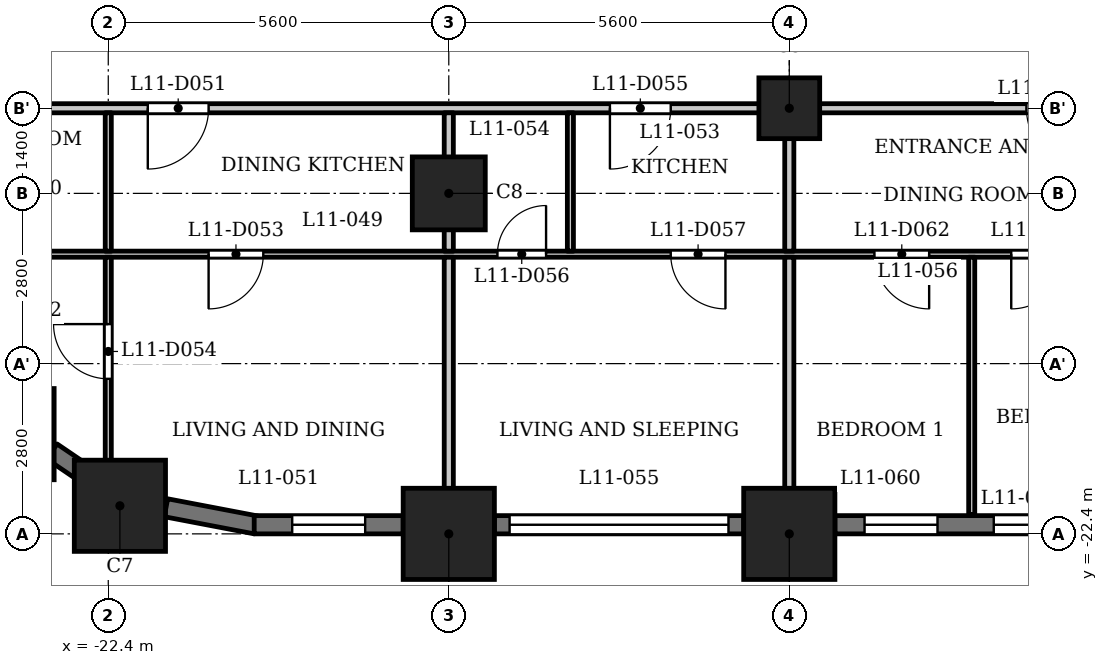
"""IFC4 building model, lengths in metres.
Left out: names, types, materials, properties, quantities, classifications, styles, units other than length and angle.
Written with IfcOpenShell. Run it as: python <this file> out.ifc"""

import sys

from ifc_helpers import new_model, si_unit, direction, frame, frame_2d, origin, origin_2d, place, context, subcontext, project, spatial, rectangle, extrude, element, fill, save


model = new_model("IFC4")
c1 = context("Model", 3, precision=1e-05, world=origin(), true_north=direction((0.0, 1.0)))
c2 = subcontext(c1, "Body", "Model", "MODEL_VIEW")
j1 = project(units=[si_unit("LENGTHUNIT", "METRE"), si_unit("PLANEANGLEUNIT", "RADIAN")], contexts=[c1])
p1 = place(None, origin())
s1 = spatial("IfcSite", under=j1, at=p1, CompositionType="ELEMENT")
p2 = place(p1, origin())
s2 = spatial("IfcBuilding", under=s1, at=p2, CompositionType="ELEMENT")
p3 = place(p2, frame((0.0, 0.0, 48.0)))
s3 = spatial("IfcBuildingStorey", under=s2, at=p3, CompositionType="ELEMENT", Elevation=48.0)
for number, where, z_axis, x_axis in (
    (1, (-22.209, -21.938, 0.0), (0.0, 0.0, 1.0), (1.0, 0.0, 0.0)),
    (2, (-16.8, -22.4, 0.0), (0.0, 0.0, 1.0), (1.0, 0.0, 0.0)),
    (3, (-11.2, -22.4, 0.0), (0.0, 0.0, 1.0), (1.0, 0.0, 0.0)),
    (4, (-24.04, -20.76, 0.0), (0.0, 0.0, 1.0), (1.0, 0.0, 0.0)),
):
    element("IfcColumn", number, at=place(p3, frame(where, z_axis=z_axis, x_axis=x_axis)), inside=s3, PredefinedType="COLUMN", context=c2, shape_type="SweptSolid", body=[
        extrude(rectangle(XDim=1.5, YDim=1.5, at=origin_2d()), origin(), (0.0, 0.0, 1.0), 3.5),
    ])
p4 = place(p3, frame((-16.8, -16.8, 0.0), z_axis=(0.0, 0.0, 1.0), x_axis=(1.0, 0.0, 0.0)))
e5 = element("IfcColumn", 5, at=p4, inside=s3, PredefinedType="COLUMN", context=c2, shape_type="SweptSolid", body=[
    extrude(rectangle(XDim=1.2, YDim=1.2, at=origin_2d()), origin(), (0.0, 0.0, 1.0), 3.5),
])
p5 = place(p3, frame((-11.2, -15.4, 0.0), z_axis=(0.0, 0.0, 1.0), x_axis=(1.0, 0.0, 0.0)))
e6 = element("IfcColumn", 6, at=p5, inside=s3, PredefinedType="COLUMN", context=c2, shape_type="SweptSolid", body=[
    extrude(rectangle(XDim=1.0, YDim=1.0, at=origin_2d()), origin(), (0.0, 0.0, 1.0), 3.5),
])
p6 = place(p3, frame((-23.327, -21.045, 0.0), z_axis=(0.0, 0.0, 1.0), x_axis=(0.827080706709, -0.562083182981, 0.0)))
e7 = element("IfcWall", 7, at=p6, inside=s3, PredefinedType="SOLIDWALL", context=c2, shape_type="SweptSolid", body=[
    extrude(rectangle(XDim=0.677, YDim=0.3, at=frame_2d((0.339, 0.0))), origin(), (0.0, 0.0, 1.0), 3.2),
])
p7 = place(p3, frame((-21.451, -21.97, 0.0), z_axis=(0.0, 0.0, 1.0), x_axis=(0.982287454367, -0.187380247071, 0.0)))
e8 = element("IfcWall", 8, at=p7, inside=s3, PredefinedType="SOLIDWALL", context=c2, shape_type="SweptSolid", body=[
    extrude(rectangle(XDim=1.506, YDim=0.3, at=frame_2d((0.753, 0.0))), origin(), (0.0, 0.0, 1.0), 2.35),
])
p8 = place(p3, frame((-20.0, -22.25, 0.0), z_axis=(0.0, 0.0, 1.0), x_axis=(1.0, 0.0, 0.0)))
e9 = element("IfcWall", 9, at=p8, inside=s3, PredefinedType="SOLIDWALL", context=c2, shape_type="SweptSolid", body=[
    extrude(rectangle(XDim=2.45, YDim=0.3, at=frame_2d((1.225, 0.0))), origin(), (0.0, 0.0, 1.0), 2.35),
])
p9 = place(p8, frame((0.625, 0.0, 0.6)))
e10 = element("IfcOpeningElement", 10, at=p9, cuts=e9, PredefinedType="OPENING", context=c2, shape_type="SweptSolid", body=[
    extrude(rectangle(XDim=1.2, YDim=1.55, at=frame_2d((0.6, 0.775))), frame((0.0, 0.16, 0.0), z_axis=(0.0, -1.0, 0.0), x_axis=(1.0, 0.0, 0.0)), (0.0, 0.0, 1.0), 0.32),
])
p10 = place(p3, frame((-16.05, -22.25, 0.0), z_axis=(0.0, 0.0, 1.0), x_axis=(1.0, 0.0, 0.0)))
e11 = element("IfcWall", 11, at=p10, inside=s3, PredefinedType="SOLIDWALL", context=c2, shape_type="SweptSolid", body=[
    extrude(rectangle(XDim=4.1, YDim=0.3, at=frame_2d((2.05, 0.0))), origin(), (0.0, 0.0, 1.0), 2.35),
])
p11 = place(p10, frame((0.25, 0.0, 1.2)))
e12 = element("IfcOpeningElement", 12, at=p11, cuts=e11, PredefinedType="OPENING", context=c2, shape_type="SweptSolid", body=[
    extrude(rectangle(XDim=3.6, YDim=0.95, at=frame_2d((1.8, 0.475))), frame((0.0, 0.16, 0.0), z_axis=(0.0, -1.0, 0.0), x_axis=(1.0, 0.0, 0.0)), (0.0, 0.0, 1.0), 0.32),
])
p12 = place(p3, frame((-10.45, -22.25, 0.0), z_axis=(0.0, 0.0, 1.0), x_axis=(1.0, 0.0, 0.0)))
e13 = element("IfcWall", 13, at=p12, inside=s3, PredefinedType="SOLIDWALL", context=c2, shape_type="SweptSolid", body=[
    extrude(rectangle(XDim=4.1, YDim=0.3, at=frame_2d((2.05, 0.0))), origin(), (0.0, 0.0, 1.0), 2.35),
])
p13 = place(p12, frame((0.488, 0.0, 0.6)))
e14 = element("IfcOpeningElement", 14, at=p13, cuts=e13, PredefinedType="OPENING", context=c2, shape_type="SweptSolid", body=[
    extrude(rectangle(XDim=1.2, YDim=1.55, at=frame_2d((0.6, 0.775))), frame((0.0, 0.16, 0.0), z_axis=(0.0, -1.0, 0.0), x_axis=(1.0, 0.0, 0.0)), (0.0, 0.0, 1.0), 0.32),
])
p14 = place(p12, frame((2.613, 0.0, 0.6)))
e15 = element("IfcOpeningElement", 15, at=p14, cuts=e13, PredefinedType="OPENING", context=c2, shape_type="SweptSolid", body=[
    extrude(rectangle(XDim=1.2, YDim=1.55, at=frame_2d((0.6, 0.775))), frame((0.0, 0.16, 0.0), z_axis=(0.0, -1.0, 0.0), x_axis=(1.0, 0.0, 0.0)), (0.0, 0.0, 1.0), 0.32),
])
p15 = place(p3, frame((-26.394, -17.8, 0.0), z_axis=(0.0, 0.0, 1.0), x_axis=(1.0, 0.0, 0.0)))
e16 = element("IfcWall", 16, at=p15, inside=s3, PredefinedType="PARTITIONING", context=c2, shape_type="SweptSolid", body=[
    extrude(rectangle(XDim=53.126, YDim=0.1, at=frame_2d((26.563, 0.0))), origin(), (0.0, 0.0, 1.0), 3.2),
])
p16 = place(p15, frame((0.794, 0.0, 0.0)))
e17 = element("IfcOpeningElement", 17, at=p16, cuts=e16, PredefinedType="OPENING", context=c2, shape_type="SweptSolid", body=[
    extrude(rectangle(XDim=0.8, YDim=2.1, at=frame_2d((0.4, 1.05))), frame((0.0, 0.06, 0.0), z_axis=(0.0, -1.0, 0.0), x_axis=(1.0, 0.0, 0.0)), (0.0, 0.0, 1.0), 0.12),
])
p17 = place(p15, frame((5.644, 0.0, 0.0)))
e18 = element("IfcOpeningElement", 18, at=p17, cuts=e16, PredefinedType="OPENING", context=c2, shape_type="SweptSolid", body=[
    extrude(rectangle(XDim=0.9, YDim=2.1, at=frame_2d((0.45, 1.05))), frame((0.0, 0.06, 0.0), z_axis=(0.0, -1.0, 0.0), x_axis=(1.0, 0.0, 0.0)), (0.0, 0.0, 1.0), 0.12),
])
p18 = place(p15, frame((10.394, 0.0, 0.0)))
e19 = element("IfcOpeningElement", 19, at=p18, cuts=e16, PredefinedType="OPENING", context=c2, shape_type="SweptSolid", body=[
    extrude(rectangle(XDim=0.8, YDim=2.1, at=frame_2d((0.4, 1.05))), frame((0.0, 0.06, 0.0), z_axis=(0.0, -1.0, 0.0), x_axis=(1.0, 0.0, 0.0)), (0.0, 0.0, 1.0), 0.12),
])
p19 = place(p15, frame((13.244, 0.0, 0.0)))
e20 = element("IfcOpeningElement", 20, at=p19, cuts=e16, PredefinedType="OPENING", context=c2, shape_type="SweptSolid", body=[
    extrude(rectangle(XDim=0.9, YDim=2.1, at=frame_2d((0.45, 1.05))), frame((0.0, 0.06, 0.0), z_axis=(0.0, -1.0, 0.0), x_axis=(1.0, 0.0, 0.0)), (0.0, 0.0, 1.0), 0.12),
])
p20 = place(p15, frame((23.944, 0.0, 0.0)))
e21 = element("IfcOpeningElement", 21, at=p20, cuts=e16, PredefinedType="OPENING", context=c2, shape_type="SweptSolid", body=[
    extrude(rectangle(XDim=0.8, YDim=2.1, at=frame_2d((0.4, 1.05))), frame((0.0, 0.06, 0.0), z_axis=(0.0, -1.0, 0.0), x_axis=(1.0, 0.0, 0.0)), (0.0, 0.0, 1.0), 0.12),
])
p21 = place(p15, frame((22.194, 0.0, 0.0)))
e22 = element("IfcOpeningElement", 22, at=p21, cuts=e16, PredefinedType="OPENING", context=c2, shape_type="SweptSolid", body=[
    extrude(rectangle(XDim=0.9, YDim=2.1, at=frame_2d((0.45, 1.05))), frame((0.0, 0.06, 0.0), z_axis=(0.0, -1.0, 0.0), x_axis=(1.0, 0.0, 0.0)), (0.0, 0.0, 1.0), 0.12),
])
p22 = place(p15, frame((16.594, 0.0, 0.0)))
e23 = element("IfcOpeningElement", 23, at=p22, cuts=e16, PredefinedType="OPENING", context=c2, shape_type="SweptSolid", body=[
    extrude(rectangle(XDim=0.9, YDim=2.1, at=frame_2d((0.45, 1.05))), frame((0.0, 0.06, 0.0), z_axis=(0.0, -1.0, 0.0), x_axis=(1.0, 0.0, 0.0)), (0.0, 0.0, 1.0), 0.12),
])
p23 = place(p15, frame((18.844, 0.0, 0.0)))
e24 = element("IfcOpeningElement", 24, at=p23, cuts=e16, PredefinedType="OPENING", context=c2, shape_type="SweptSolid", body=[
    extrude(rectangle(XDim=0.9, YDim=2.1, at=frame_2d((0.45, 1.05))), frame((0.0, 0.06, 0.0), z_axis=(0.0, -1.0, 0.0), x_axis=(1.0, 0.0, 0.0)), (0.0, 0.0, 1.0), 0.12),
])
p24 = place(p15, frame((30.544, 0.0, 0.0)))
e25 = element("IfcOpeningElement", 25, at=p24, cuts=e16, PredefinedType="OPENING", context=c2, shape_type="SweptSolid", body=[
    extrude(rectangle(XDim=0.8, YDim=2.1, at=frame_2d((0.4, 1.05))), frame((0.0, 0.06, 0.0), z_axis=(0.0, -1.0, 0.0), x_axis=(1.0, 0.0, 0.0)), (0.0, 0.0, 1.0), 0.12),
])
p25 = place(p15, frame((27.294, 0.0, 0.0)))
e26 = element("IfcOpeningElement", 26, at=p25, cuts=e16, PredefinedType="OPENING", context=c2, shape_type="SweptSolid", body=[
    extrude(rectangle(XDim=0.9, YDim=2.1, at=frame_2d((0.45, 1.05))), frame((0.0, 0.06, 0.0), z_axis=(0.0, -1.0, 0.0), x_axis=(1.0, 0.0, 0.0)), (0.0, 0.0, 1.0), 0.12),
])
p26 = place(p15, frame((35.894, 0.0, 0.0)))
e27 = element("IfcOpeningElement", 27, at=p26, cuts=e16, PredefinedType="OPENING", context=c2, shape_type="SweptSolid", body=[
    extrude(rectangle(XDim=0.8, YDim=2.1, at=frame_2d((0.4, 1.05))), frame((0.0, 0.06, 0.0), z_axis=(0.0, -1.0, 0.0), x_axis=(1.0, 0.0, 0.0)), (0.0, 0.0, 1.0), 0.12),
])
p27 = place(p15, frame((33.644, 0.0, 0.0)))
e28 = element("IfcOpeningElement", 28, at=p27, cuts=e16, PredefinedType="OPENING", context=c2, shape_type="SweptSolid", body=[
    extrude(rectangle(XDim=0.9, YDim=2.1, at=frame_2d((0.45, 1.05))), frame((0.0, 0.06, 0.0), z_axis=(0.0, -1.0, 0.0), x_axis=(1.0, 0.0, 0.0)), (0.0, 0.0, 1.0), 0.12),
])
p28 = place(p15, frame((41.494, 0.0, 0.0)))
e29 = element("IfcOpeningElement", 29, at=p28, cuts=e16, PredefinedType="OPENING", context=c2, shape_type="SweptSolid", body=[
    extrude(rectangle(XDim=0.8, YDim=2.1, at=frame_2d((0.4, 1.05))), frame((0.0, 0.06, 0.0), z_axis=(0.0, -1.0, 0.0), x_axis=(1.0, 0.0, 0.0)), (0.0, 0.0, 1.0), 0.12),
])
p29 = place(p15, frame((38.744, 0.0, 0.0)))
e30 = element("IfcOpeningElement", 30, at=p29, cuts=e16, PredefinedType="OPENING", context=c2, shape_type="SweptSolid", body=[
    extrude(rectangle(XDim=0.9, YDim=2.1, at=frame_2d((0.45, 1.05))), frame((0.0, 0.06, 0.0), z_axis=(0.0, -1.0, 0.0), x_axis=(1.0, 0.0, 0.0)), (0.0, 0.0, 1.0), 0.12),
])
p30 = place(p15, frame((49.362, 0.0, 0.0)))
e31 = element("IfcOpeningElement", 31, at=p30, cuts=e16, PredefinedType="OPENING", context=c2, shape_type="SweptSolid", body=[
    extrude(rectangle(XDim=0.8, YDim=2.1, at=frame_2d((0.4, 1.05))), frame((0.0, 0.06, 0.0), z_axis=(0.0, -1.0, 0.0), x_axis=(1.0, 0.0, 0.0)), (0.0, 0.0, 1.0), 0.12),
])
p31 = place(p15, frame((45.094, 0.0, 0.0)))
e32 = element("IfcOpeningElement", 32, at=p31, cuts=e16, PredefinedType="OPENING", context=c2, shape_type="SweptSolid", body=[
    extrude(rectangle(XDim=0.9, YDim=2.1, at=frame_2d((0.45, 1.05))), frame((0.0, 0.06, 0.0), z_axis=(0.0, -1.0, 0.0), x_axis=(1.0, 0.0, 0.0)), (0.0, 0.0, 1.0), 0.12),
])
p32 = place(p3, frame((-27.484, -15.4, 0.0), z_axis=(0.0, 0.0, 1.0), x_axis=(1.0, 0.0, 0.0)))
e33 = element("IfcWall", 33, at=p32, inside=s3, PredefinedType="PARTITIONING", context=c2, shape_type="SweptSolid", body=[
    extrude(rectangle(XDim=54.968, YDim=0.15, at=frame_2d((27.484, 0.0))), origin(), (0.0, 0.0, 1.0), 3.2),
])
p33 = place(p32, frame((5.734, 0.0, 0.0)))
e34 = element("IfcOpeningElement", 34, at=p33, cuts=e33, PredefinedType="OPENING", context=c2, shape_type="SweptSolid", body=[
    extrude(rectangle(XDim=1.0, YDim=2.1, at=frame_2d((0.5, 1.05))), frame((0.0, 0.085, 0.0), z_axis=(0.0, -1.0, 0.0), x_axis=(1.0, 0.0, 0.0)), (0.0, 0.0, 1.0), 0.17),
])
p34 = place(p32, frame((13.334, 0.0, 0.0)))
e35 = element("IfcOpeningElement", 35, at=p34, cuts=e33, PredefinedType="OPENING", context=c2, shape_type="SweptSolid", body=[
    extrude(rectangle(XDim=1.0, YDim=2.1, at=frame_2d((0.5, 1.05))), frame((0.0, 0.085, 0.0), z_axis=(0.0, -1.0, 0.0), x_axis=(1.0, 0.0, 0.0)), (0.0, 0.0, 1.0), 0.17),
])
p35 = place(p32, frame((20.184, 0.0, 0.0)))
e36 = element("IfcOpeningElement", 36, at=p35, cuts=e33, PredefinedType="OPENING", context=c2, shape_type="SweptSolid", body=[
    extrude(rectangle(XDim=1.0, YDim=2.1, at=frame_2d((0.5, 1.05))), frame((0.0, 0.085, 0.0), z_axis=(0.0, -1.0, 0.0), x_axis=(1.0, 0.0, 0.0)), (0.0, 0.0, 1.0), 0.17),
])
p36 = place(p32, frame((29.384, 0.0, 0.0)))
e37 = element("IfcOpeningElement", 37, at=p36, cuts=e33, PredefinedType="OPENING", context=c2, shape_type="SweptSolid", body=[
    extrude(rectangle(XDim=1.0, YDim=2.1, at=frame_2d((0.5, 1.05))), frame((0.0, 0.085, 0.0), z_axis=(0.0, -1.0, 0.0), x_axis=(1.0, 0.0, 0.0)), (0.0, 0.0, 1.0), 0.17),
])
p37 = place(p32, frame((33.734, 0.0, 0.0)))
e38 = element("IfcOpeningElement", 38, at=p37, cuts=e33, PredefinedType="OPENING", context=c2, shape_type="SweptSolid", body=[
    extrude(rectangle(XDim=1.0, YDim=2.1, at=frame_2d((0.5, 1.05))), frame((0.0, 0.085, 0.0), z_axis=(0.0, -1.0, 0.0), x_axis=(1.0, 0.0, 0.0)), (0.0, 0.0, 1.0), 0.17),
])
p38 = place(p32, frame((39.584, 0.0, 0.0)))
e39 = element("IfcOpeningElement", 39, at=p38, cuts=e33, PredefinedType="OPENING", context=c2, shape_type="SweptSolid", body=[
    extrude(rectangle(XDim=1.0, YDim=2.1, at=frame_2d((0.5, 1.05))), frame((0.0, 0.085, 0.0), z_axis=(0.0, -1.0, 0.0), x_axis=(1.0, 0.0, 0.0)), (0.0, 0.0, 1.0), 0.17),
])
p39 = place(p32, frame((45.184, 0.0, 0.0)))
e40 = element("IfcOpeningElement", 40, at=p39, cuts=e33, PredefinedType="OPENING", context=c2, shape_type="SweptSolid", body=[
    extrude(rectangle(XDim=1.0, YDim=2.1, at=frame_2d((0.5, 1.05))), frame((0.0, 0.085, 0.0), z_axis=(0.0, -1.0, 0.0), x_axis=(1.0, 0.0, 0.0)), (0.0, 0.0, 1.0), 0.17),
])
p40 = place(p3, frame((-22.4, -21.72, 0.0), z_axis=(0.0, 0.0, 1.0), x_axis=(0.0, 1.0, 0.0)))
e41 = element("IfcWall", 41, at=p40, inside=s3, PredefinedType="PARTITIONING", context=c2, shape_type="SweptSolid", body=[
    extrude(rectangle(XDim=3.87, YDim=0.1, at=frame_2d((1.935, 0.0))), origin(), (0.0, 0.0, 1.0), 3.2),
])
p41 = place(p40, frame((1.87, 0.0, 0.0)))
e42 = element("IfcOpeningElement", 42, at=p41, cuts=e41, PredefinedType="OPENING", context=c2, shape_type="SweptSolid", body=[
    extrude(rectangle(XDim=0.9, YDim=2.1, at=frame_2d((0.45, 1.05))), frame((0.0, 0.06, 0.0), z_axis=(0.0, -1.0, 0.0), x_axis=(1.0, 0.0, 0.0)), (0.0, 0.0, 1.0), 0.12),
])
p42 = place(p3, frame((-22.4, -17.75, 0.0), z_axis=(0.0, 0.0, 1.0), x_axis=(0.0, 1.0, 0.0)))
e43 = element("IfcWall", 43, at=p42, inside=s3, PredefinedType="PARTITIONING", context=c2, shape_type="SweptSolid", body=[
    extrude(rectangle(XDim=2.275, YDim=0.1, at=frame_2d((1.137, 0.0))), origin(), (0.0, 0.0, 1.0), 3.2),
])
p43 = place(p3, frame((-16.8, -23.13, 0.0), z_axis=(0.0, 0.0, 1.0), x_axis=(0.0, 1.0, 0.0)))
e44 = element("IfcWall", 44, at=p43, inside=s3, PredefinedType="PARTITIONING", context=c2, shape_type="SweptSolid", body=[
    extrude(rectangle(XDim=5.28, YDim=0.15, at=frame_2d((2.64, 0.0))), origin(), (0.0, 0.0, 1.0), 3.2),
])
p44 = place(p3, frame((-16.8, -17.75, 0.0), z_axis=(0.0, 0.0, 1.0), x_axis=(0.0, 1.0, 0.0)))
e45 = element("IfcWall", 45, at=p44, inside=s3, PredefinedType="PARTITIONING", context=c2, shape_type="SweptSolid", body=[
    extrude(rectangle(XDim=2.275, YDim=0.15, at=frame_2d((1.137, 0.0))), origin(), (0.0, 0.0, 1.0), 3.2),
])
p45 = place(p3, frame((-14.8, -17.75, 0.0), z_axis=(0.0, 0.0, 1.0), x_axis=(0.0, 1.0, 0.0)))
e46 = element("IfcWall", 46, at=p45, inside=s3, PredefinedType="PARTITIONING", context=c2, shape_type="SweptSolid", body=[
    extrude(rectangle(XDim=2.275, YDim=0.1, at=frame_2d((1.137, 0.0))), origin(), (0.0, 0.0, 1.0), 3.2),
])
p46 = place(p3, frame((-11.2, -23.13, 0.0), z_axis=(0.0, 0.0, 1.0), x_axis=(0.0, 1.0, 0.0)))
e47 = element("IfcWall", 47, at=p46, inside=s3, PredefinedType="PARTITIONING", context=c2, shape_type="SweptSolid", body=[
    extrude(rectangle(XDim=5.28, YDim=0.15, at=frame_2d((2.64, 0.0))), origin(), (0.0, 0.0, 1.0), 3.2),
])
p47 = place(p3, frame((-11.2, -17.75, 0.0), z_axis=(0.0, 0.0, 1.0), x_axis=(0.0, 1.0, 0.0)))
e48 = element("IfcWall", 48, at=p47, inside=s3, PredefinedType="PARTITIONING", context=c2, shape_type="SweptSolid", body=[
    extrude(rectangle(XDim=2.275, YDim=0.15, at=frame_2d((1.137, 0.0))), origin(), (0.0, 0.0, 1.0), 3.2),
])
p48 = place(p3, frame((-8.2, -22.08, 0.0), z_axis=(0.0, 0.0, 1.0), x_axis=(0.0, 1.0, 0.0)))
e49 = element("IfcWall", 49, at=p48, inside=s3, PredefinedType="PARTITIONING", context=c2, shape_type="SweptSolid", body=[
    extrude(rectangle(XDim=4.23, YDim=0.1, at=frame_2d((2.115, 0.0))), origin(), (0.0, 0.0, 1.0), 3.2),
])
p49 = place(p33, origin())
e50 = element("IfcDoor", 50, at=p49, inside=s3, OperationType="SINGLE_SWING_LEFT", PredefinedType="DOOR", context=c2, shape_type="SweptSolid", body=[
    extrude(rectangle(XDim=1.0, YDim=2.1, at=frame_2d((0.5, 1.05))), frame((0.0, 0.025, 0.0), z_axis=(0.0, -1.0, 0.0), x_axis=(1.0, 0.0, 0.0)), (0.0, 0.0, 1.0), 0.05),
])
fill(e34, e50)
p50 = place(p17, origin())
e51 = element("IfcDoor", 51, at=p50, inside=s3, OperationType="SINGLE_SWING_LEFT", PredefinedType="DOOR", context=c2, shape_type="SweptSolid", body=[
    extrude(rectangle(XDim=0.9, YDim=2.1, at=frame_2d((0.45, 1.05))), frame((0.0, 0.025, 0.0), z_axis=(0.0, -1.0, 0.0), x_axis=(1.0, 0.0, 0.0)), (0.0, 0.0, 1.0), 0.05),
])
fill(e18, e51)
p51 = place(p41, origin())
e52 = element("IfcDoor", 52, at=p51, inside=s3, OperationType="SINGLE_SWING_LEFT", PredefinedType="DOOR", context=c2, shape_type="SweptSolid", body=[
    extrude(rectangle(XDim=0.9, YDim=2.1, at=frame_2d((0.45, 1.05))), frame((0.0, 0.025, 0.0), z_axis=(0.0, -1.0, 0.0), x_axis=(1.0, 0.0, 0.0)), (0.0, 0.0, 1.0), 0.05),
])
fill(e42, e52)
p52 = place(p34, origin())
e53 = element("IfcDoor", 53, at=p52, inside=s3, OperationType="SINGLE_SWING_LEFT", PredefinedType="DOOR", context=c2, shape_type="SweptSolid", body=[
    extrude(rectangle(XDim=1.0, YDim=2.1, at=frame_2d((0.5, 1.05))), frame((0.0, 0.025, 0.0), z_axis=(0.0, -1.0, 0.0), x_axis=(1.0, 0.0, 0.0)), (0.0, 0.0, 1.0), 0.05),
])
fill(e35, e53)
p53 = place(p18, origin())
e54 = element("IfcDoor", 54, at=p53, inside=s3, OperationType="SINGLE_SWING_LEFT", PredefinedType="DOOR", context=c2, shape_type="SweptSolid", body=[
    extrude(rectangle(XDim=0.8, YDim=2.1, at=frame_2d((0.4, 1.05))), frame((0.0, 0.025, 0.0), z_axis=(0.0, -1.0, 0.0), x_axis=(1.0, 0.0, 0.0)), (0.0, 0.0, 1.0), 0.05),
])
fill(e19, e54)
p54 = place(p19, origin())
e55 = element("IfcDoor", 55, at=p54, inside=s3, OperationType="SINGLE_SWING_RIGHT", PredefinedType="DOOR", context=c2, shape_type="SweptSolid", body=[
    extrude(rectangle(XDim=0.9, YDim=2.1, at=frame_2d((0.45, 1.05))), frame((0.0, 0.025, 0.0), z_axis=(0.0, -1.0, 0.0), x_axis=(1.0, 0.0, 0.0)), (0.0, 0.0, 1.0), 0.05),
])
fill(e20, e55)
p55 = place(p35, origin())
e56 = element("IfcDoor", 56, at=p55, inside=s3, OperationType="SINGLE_SWING_RIGHT", PredefinedType="DOOR", context=c2, shape_type="SweptSolid", body=[
    extrude(rectangle(XDim=1.0, YDim=2.1, at=frame_2d((0.5, 1.05))), frame((0.0, 0.025, 0.0), z_axis=(0.0, -1.0, 0.0), x_axis=(1.0, 0.0, 0.0)), (0.0, 0.0, 1.0), 0.05),
])
fill(e36, e56)
p56 = place(p22, origin())
e57 = element("IfcDoor", 57, at=p56, inside=s3, OperationType="SINGLE_SWING_RIGHT", PredefinedType="DOOR", context=c2, shape_type="SweptSolid", body=[
    extrude(rectangle(XDim=0.9, YDim=2.1, at=frame_2d((0.45, 1.05))), frame((0.0, 0.025, 0.0), z_axis=(0.0, -1.0, 0.0), x_axis=(1.0, 0.0, 0.0)), (0.0, 0.0, 1.0), 0.05),
])
fill(e23, e57)
p57 = place(p23, origin())
e58 = element("IfcDoor", 58, at=p57, inside=s3, OperationType="SINGLE_SWING_LEFT", PredefinedType="DOOR", context=c2, shape_type="SweptSolid", body=[
    extrude(rectangle(XDim=0.9, YDim=2.1, at=frame_2d((0.45, 1.05))), frame((0.0, 0.025, 0.0), z_axis=(0.0, -1.0, 0.0), x_axis=(1.0, 0.0, 0.0)), (0.0, 0.0, 1.0), 0.05),
])
fill(e24, e58)
p58 = place(p9, origin())
e59 = element("IfcWindow", 59, at=p58, inside=s3, PartitioningType="SINGLE_PANEL", PredefinedType="WINDOW", context=c2, shape_type="SweptSolid", body=[
    extrude(rectangle(XDim=1.2, YDim=1.55, at=frame_2d((0.6, 0.775))), frame((0.0, 0.03, 0.0), z_axis=(0.0, -1.0, 0.0), x_axis=(1.0, 0.0, 0.0)), (0.0, 0.0, 1.0), 0.06),
])
fill(e10, e59)
p59 = place(p11, origin())
e60 = element("IfcWindow", 60, at=p59, inside=s3, PartitioningType="SINGLE_PANEL", PredefinedType="WINDOW", context=c2, shape_type="SweptSolid", body=[
    extrude(rectangle(XDim=3.6, YDim=0.95, at=frame_2d((1.8, 0.475))), frame((0.0, 0.03, 0.0), z_axis=(0.0, -1.0, 0.0), x_axis=(1.0, 0.0, 0.0)), (0.0, 0.0, 1.0), 0.06),
])
fill(e12, e60)
p60 = place(p13, origin())
e61 = element("IfcWindow", 61, at=p60, inside=s3, PartitioningType="SINGLE_PANEL", PredefinedType="WINDOW", context=c2, shape_type="SweptSolid", body=[
    extrude(rectangle(XDim=1.2, YDim=1.55, at=frame_2d((0.6, 0.775))), frame((0.0, 0.03, 0.0), z_axis=(0.0, -1.0, 0.0), x_axis=(1.0, 0.0, 0.0)), (0.0, 0.0, 1.0), 0.06),
])
fill(e14, e61)
p61 = place(p14, origin())
e62 = element("IfcWindow", 62, at=p61, inside=s3, PartitioningType="SINGLE_PANEL", PredefinedType="WINDOW", context=c2, shape_type="SweptSolid", body=[
    extrude(rectangle(XDim=1.2, YDim=1.55, at=frame_2d((0.6, 0.775))), frame((0.0, 0.03, 0.0), z_axis=(0.0, -1.0, 0.0), x_axis=(1.0, 0.0, 0.0)), (0.0, 0.0, 1.0), 0.06),
])
fill(e15, e62)
save(model, sys.argv[1])
